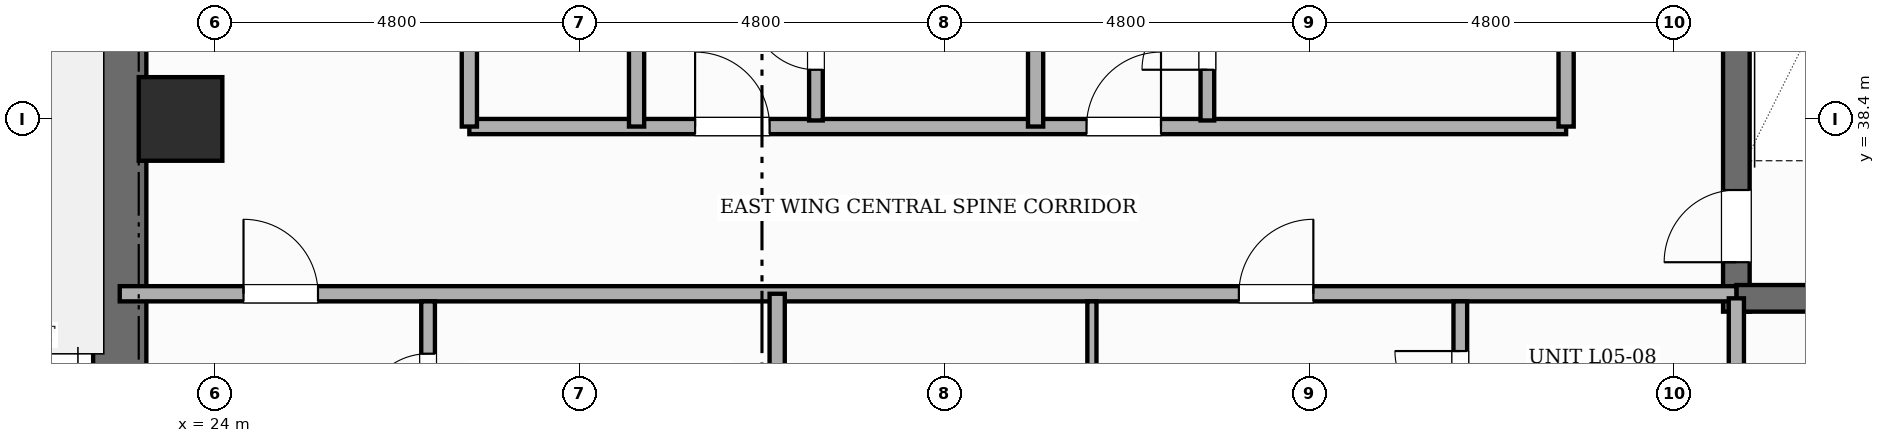
"""IFC4 building model, lengths in metres.
Left out: names, types, materials, properties, quantities, classifications, styles, units other than length and angle.
Written with IfcOpenShell. Run it as: python <this file> out.ifc"""

import sys

from ifc_helpers import new_model, si_unit, direction, frame, frame_2d, origin, origin_2d, place, context, subcontext, project, spatial, rectangle, extrude, element, fill, save


model = new_model("IFC4")
c1 = context("Model", 3, precision=1e-05, world=origin(), true_north=direction((0.0, 1.0)))
c2 = subcontext(c1, "Body", "Model", "MODEL_VIEW")
j1 = project(units=[si_unit("LENGTHUNIT", "METRE"), si_unit("PLANEANGLEUNIT", "RADIAN")], contexts=[c1])
p1 = place(None, origin())
s1 = spatial("IfcSite", under=j1, at=p1, CompositionType="ELEMENT")
p2 = place(p1, origin())
s2 = spatial("IfcBuilding", under=s1, at=p2, CompositionType="ELEMENT")
p3 = place(p2, frame((0.0, 0.0, 25.0)))
s3 = spatial("IfcBuildingStorey", under=s2, at=p3, CompositionType="ELEMENT", Elevation=25.0)
p4 = place(p3, frame((22.75, 30.55, 0.0), z_axis=(0.0, 0.0, 1.0), x_axis=(0.0, 1.0, 0.0)))
e1 = element("IfcWall", 1, at=p4, inside=s3, PredefinedType="SHEAR", context=c2, shape_type="SweptSolid", body=[
    extrude(rectangle(XDim=15.6, YDim=0.7, at=frame_2d((7.8, 0.0))), origin(), (0.0, 0.0, 1.0), 3.6),
])
p5 = place(p4, frame((10.8, 0.0, 0.0)))
e2 = element("IfcOpeningElement", 2, at=p5, cuts=e1, PredefinedType="OPENING", context=c2, shape_type="SweptSolid", body=[
    extrude(rectangle(XDim=1.0, YDim=2.15, at=frame_2d((0.5, 1.075))), frame((0.0, 0.36, 0.0), z_axis=(0.0, -1.0, 0.0), x_axis=(1.0, 0.0, 0.0)), (0.0, 0.0, 1.0), 0.72),
])
p6 = place(p3, frame((44.02, 35.865, 0.0), z_axis=(0.0, 0.0, 1.0), x_axis=(0.0, 1.0, 0.0)))
e3 = element("IfcWall", 3, at=p6, inside=s3, PredefinedType="SHEAR", context=c2, shape_type="SweptSolid", body=[
    extrude(rectangle(XDim=8.97, YDim=0.35, at=frame_2d((4.485, 0.0))), origin(), (0.0, 0.0, 1.0), 3.6),
])
p7 = place(p6, frame((0.65, 0.0, 0.0)))
e4 = element("IfcOpeningElement", 4, at=p7, cuts=e3, PredefinedType="OPENING", context=c2, shape_type="SweptSolid", body=[
    extrude(rectangle(XDim=0.95, YDim=2.1, at=frame_2d((0.475, 1.05))), frame((0.0, 0.185, 0.0), z_axis=(0.0, -1.0, 0.0), x_axis=(1.0, 0.0, 0.0)), (0.0, 0.0, 1.0), 0.37),
])
p8 = place(p3, frame((44.02, 36.04, 0.0), z_axis=(0.0, 0.0, 1.0), x_axis=(1.0, 0.0, 0.0)))
e5 = element("IfcWall", 5, at=p8, inside=s3, PredefinedType="SHEAR", context=c2, shape_type="SweptSolid", body=[
    extrude(rectangle(XDim=3.58, YDim=0.35, at=frame_2d((1.79, 0.0))), origin(), (0.0, 0.0, 1.0), 3.6),
])
p9 = place(p3, frame((23.55, 38.4, 0.0), z_axis=(0.0, 0.0, 1.0), x_axis=(1.0, 0.0, 0.0)))
e6 = element("IfcColumn", 6, at=p9, inside=s3, PredefinedType="COLUMN", context=c2, shape_type="SweptSolid", body=[
    extrude(rectangle(XDim=1.1, YDim=1.1, at=origin_2d()), origin(), (0.0, 0.0, 1.0), 3.6),
])
p10 = place(p3, frame((22.75, 36.1, 0.0), z_axis=(0.0, 0.0, 1.0), x_axis=(1.0, 0.0, 0.0)))
e7 = element("IfcWall", 7, at=p10, inside=s3, PredefinedType="PARTITIONING", context=c2, shape_type="SweptSolid", body=[
    extrude(rectangle(XDim=21.27, YDim=0.2, at=frame_2d((10.635, 0.0))), origin(), (0.0, 0.0, 1.0), 3.35),
])
p11 = place(p10, frame((1.628, 0.0, 0.0)))
e8 = element("IfcOpeningElement", 8, at=p11, cuts=e7, PredefinedType="OPENING", context=c2, shape_type="SweptSolid", body=[
    extrude(rectangle(XDim=0.98, YDim=2.18, at=frame_2d((0.49, 1.09))), frame((0.0, 0.11, 0.0), z_axis=(0.0, -1.0, 0.0), x_axis=(1.0, 0.0, 0.0)), (0.0, 0.0, 1.0), 0.22),
])
p12 = place(p10, frame((14.725, 0.0, 0.0)))
e9 = element("IfcOpeningElement", 9, at=p12, cuts=e7, PredefinedType="OPENING", context=c2, shape_type="SweptSolid", body=[
    extrude(rectangle(XDim=0.98, YDim=2.18, at=frame_2d((0.49, 1.09))), frame((0.0, 0.11, 0.0), z_axis=(0.0, -1.0, 0.0), x_axis=(1.0, 0.0, 0.0)), (0.0, 0.0, 1.0), 0.22),
])
p13 = place(p3, frame((27.35, 38.3, 0.0), z_axis=(0.0, 0.0, 1.0), x_axis=(1.0, 0.0, 0.0)))
e10 = element("IfcWall", 10, at=p13, inside=s3, PredefinedType="PARTITIONING", context=c2, shape_type="SweptSolid", body=[
    extrude(rectangle(XDim=14.43, YDim=0.2, at=frame_2d((7.215, 0.0))), origin(), (0.0, 0.0, 1.0), 3.35),
])
p14 = place(p13, frame((2.97, 0.0, 0.0)))
e11 = element("IfcOpeningElement", 11, at=p14, cuts=e10, PredefinedType="OPENING", context=c2, shape_type="SweptSolid", body=[
    extrude(rectangle(XDim=0.98, YDim=2.18, at=frame_2d((0.49, 1.09))), frame((0.0, 0.11, 0.0), z_axis=(0.0, -1.0, 0.0), x_axis=(1.0, 0.0, 0.0)), (0.0, 0.0, 1.0), 0.22),
])
p15 = place(p13, frame((8.12, 0.0, 0.0)))
e12 = element("IfcOpeningElement", 12, at=p15, cuts=e10, PredefinedType="OPENING", context=c2, shape_type="SweptSolid", body=[
    extrude(rectangle(XDim=0.98, YDim=2.18, at=frame_2d((0.49, 1.09))), frame((0.0, 0.11, 0.0), z_axis=(0.0, -1.0, 0.0), x_axis=(1.0, 0.0, 0.0)), (0.0, 0.0, 1.0), 0.22),
])
p16 = place(p3, frame((27.35, 38.3, 0.0), z_axis=(0.0, 0.0, 1.0), x_axis=(0.0, 1.0, 0.0)))
e13 = element("IfcWall", 13, at=p16, inside=s3, PredefinedType="PARTITIONING", context=c2, shape_type="SweptSolid", body=[
    extrude(rectangle(XDim=9.38, YDim=0.2, at=frame_2d((4.69, 0.0))), origin(), (0.0, 0.0, 1.0), 3.35),
])
p17 = place(p16, frame((1.2, 0.0, 0.0)))
e14 = element("IfcOpeningElement", 14, at=p17, cuts=e13, PredefinedType="OPENING", context=c2, shape_type="SweptSolid", body=[
    extrude(rectangle(XDim=0.95, YDim=2.15, at=frame_2d((0.475, 1.075))), frame((0.0, 0.11, 0.0), z_axis=(0.0, -1.0, 0.0), x_axis=(1.0, 0.0, 0.0)), (0.0, 0.0, 1.0), 0.22),
])
p18 = place(p3, frame((29.55, 38.3, 0.0), z_axis=(0.0, 0.0, 1.0), x_axis=(0.0, 1.0, 0.0)))
e15 = element("IfcWall", 15, at=p18, inside=s3, PredefinedType="SOLIDWALL", context=c2, shape_type="SweptSolid", body=[
    extrude(rectangle(XDim=9.38, YDim=0.2, at=frame_2d((4.69, 0.0))), origin(), (0.0, 0.0, 1.0), 3.35),
])
p19 = place(p3, frame((26.807, 29.12, 0.0), z_axis=(0.0, 0.0, 1.0), x_axis=(0.0, 1.0, 0.0)))
e16 = element("IfcWall", 16, at=p19, inside=s3, PredefinedType="PLUMBINGWALL", context=c2, shape_type="SweptSolid", body=[
    extrude(rectangle(XDim=6.88, YDim=0.18, at=frame_2d((3.44, 0.0))), origin(), (0.0, 0.0, 1.0), 3.35),
])
p20 = place(p19, frame((0.617, 0.0, 0.0)))
e17 = element("IfcOpeningElement", 17, at=p20, cuts=e16, PredefinedType="OPENING", context=c2, shape_type="SweptSolid", body=[
    extrude(rectangle(XDim=0.9, YDim=2.15, at=frame_2d((0.45, 1.075))), frame((0.0, 0.1, 0.0), z_axis=(0.0, -1.0, 0.0), x_axis=(1.0, 0.0, 0.0)), (0.0, 0.0, 1.0), 0.2),
])
p21 = place(p19, frame((3.21, 0.0, 0.0)))
e18 = element("IfcOpeningElement", 18, at=p21, cuts=e16, PredefinedType="OPENING", context=c2, shape_type="SweptSolid", body=[
    extrude(rectangle(XDim=0.9, YDim=2.15, at=frame_2d((0.45, 1.075))), frame((0.0, 0.1, 0.0), z_axis=(0.0, -1.0, 0.0), x_axis=(1.0, 0.0, 0.0)), (0.0, 0.0, 1.0), 0.2),
])
p22 = place(p19, frame((5.332, 0.0, 0.0)))
e19 = element("IfcOpeningElement", 19, at=p22, cuts=e16, PredefinedType="OPENING", context=c2, shape_type="SweptSolid", body=[
    extrude(rectangle(XDim=0.86, YDim=2.1, at=frame_2d((0.43, 1.05))), frame((0.0, 0.1, 0.0), z_axis=(0.0, -1.0, 0.0), x_axis=(1.0, 0.0, 0.0)), (0.0, 0.0, 1.0), 0.2),
])
p23 = place(p3, frame((31.4, 29.12, 0.0), z_axis=(0.0, 0.0, 1.0), x_axis=(0.0, 1.0, 0.0)))
e20 = element("IfcWall", 20, at=p23, inside=s3, PredefinedType="SOLIDWALL", context=c2, shape_type="SweptSolid", body=[
    extrude(rectangle(XDim=6.98, YDim=0.2, at=frame_2d((3.49, 0.0))), origin(), (0.0, 0.0, 1.0), 3.35),
])
p24 = place(p3, frame((40.388, 29.12, 0.0), z_axis=(0.0, 0.0, 1.0), x_axis=(0.0, 1.0, 0.0)))
e21 = element("IfcWall", 21, at=p24, inside=s3, PredefinedType="PLUMBINGWALL", context=c2, shape_type="SweptSolid", body=[
    extrude(rectangle(XDim=6.88, YDim=0.18, at=frame_2d((3.44, 0.0))), origin(), (0.0, 0.0, 1.0), 3.35),
])
p25 = place(p24, frame((0.679, 0.0, 0.0)))
e22 = element("IfcOpeningElement", 22, at=p25, cuts=e21, PredefinedType="OPENING", context=c2, shape_type="SweptSolid", body=[
    extrude(rectangle(XDim=0.9, YDim=2.15, at=frame_2d((0.45, 1.075))), frame((0.0, 0.1, 0.0), z_axis=(0.0, -1.0, 0.0), x_axis=(1.0, 0.0, 0.0)), (0.0, 0.0, 1.0), 0.2),
])
p26 = place(p24, frame((3.315, 0.0, 0.0)))
e23 = element("IfcOpeningElement", 23, at=p26, cuts=e21, PredefinedType="OPENING", context=c2, shape_type="SweptSolid", body=[
    extrude(rectangle(XDim=0.9, YDim=2.15, at=frame_2d((0.45, 1.075))), frame((0.0, 0.1, 0.0), z_axis=(0.0, -1.0, 0.0), x_axis=(1.0, 0.0, 0.0)), (0.0, 0.0, 1.0), 0.2),
])
p27 = place(p24, frame((5.366, 0.0, 0.0)))
e24 = element("IfcOpeningElement", 24, at=p27, cuts=e21, PredefinedType="OPENING", context=c2, shape_type="SweptSolid", body=[
    extrude(rectangle(XDim=0.86, YDim=2.1, at=frame_2d((0.43, 1.05))), frame((0.0, 0.1, 0.0), z_axis=(0.0, -1.0, 0.0), x_axis=(1.0, 0.0, 0.0)), (0.0, 0.0, 1.0), 0.2),
])
p28 = place(p3, frame((35.541, 29.12, 0.0), z_axis=(0.0, 0.0, 1.0), x_axis=(0.0, 1.0, 0.0)))
e25 = element("IfcWall", 25, at=p28, inside=s3, PredefinedType="PARTITIONING", context=c2, shape_type="SweptSolid", body=[
    extrude(rectangle(XDim=6.88, YDim=0.12, at=frame_2d((3.44, 0.0))), origin(), (0.0, 0.0, 1.0), 3.35),
])
p29 = place(p28, frame((0.679, 0.0, 0.0)))
e26 = element("IfcOpeningElement", 26, at=p29, cuts=e25, PredefinedType="OPENING", context=c2, shape_type="SweptSolid", body=[
    extrude(rectangle(XDim=0.9, YDim=2.15, at=frame_2d((0.45, 1.075))), frame((0.0, 0.07, 0.0), z_axis=(0.0, -1.0, 0.0), x_axis=(1.0, 0.0, 0.0)), (0.0, 0.0, 1.0), 0.14),
])
p30 = place(p28, frame((4.149, 0.0, 0.0)))
e27 = element("IfcOpeningElement", 27, at=p30, cuts=e25, PredefinedType="OPENING", context=c2, shape_type="SweptSolid", body=[
    extrude(rectangle(XDim=0.9, YDim=2.15, at=frame_2d((0.45, 1.075))), frame((0.0, 0.07, 0.0), z_axis=(0.0, -1.0, 0.0), x_axis=(1.0, 0.0, 0.0)), (0.0, 0.0, 1.0), 0.14),
])
p31 = place(p3, frame((31.91, 38.38, 0.0), z_axis=(0.0, 0.0, 1.0), x_axis=(0.0, 1.0, 0.0)))
e28 = element("IfcWall", 28, at=p31, inside=s3, PredefinedType="PLUMBINGWALL", context=c2, shape_type="SweptSolid", body=[
    extrude(rectangle(XDim=9.3, YDim=0.18, at=frame_2d((4.65, 0.0))), origin(), (0.0, 0.0, 1.0), 3.35),
])
p32 = place(p31, frame((0.667, 0.0, 0.0)))
e29 = element("IfcOpeningElement", 29, at=p32, cuts=e28, PredefinedType="OPENING", context=c2, shape_type="SweptSolid", body=[
    extrude(rectangle(XDim=0.86, YDim=2.1, at=frame_2d((0.43, 1.05))), frame((0.0, 0.1, 0.0), z_axis=(0.0, -1.0, 0.0), x_axis=(1.0, 0.0, 0.0)), (0.0, 0.0, 1.0), 0.2),
])
p33 = place(p31, frame((3.43, 0.0, 0.0)))
e30 = element("IfcOpeningElement", 30, at=p33, cuts=e28, PredefinedType="OPENING", context=c2, shape_type="SweptSolid", body=[
    extrude(rectangle(XDim=0.9, YDim=2.15, at=frame_2d((0.45, 1.075))), frame((0.0, 0.1, 0.0), z_axis=(0.0, -1.0, 0.0), x_axis=(1.0, 0.0, 0.0)), (0.0, 0.0, 1.0), 0.2),
])
p34 = place(p31, frame((6.828, 0.0, 0.0)))
e31 = element("IfcOpeningElement", 31, at=p34, cuts=e28, PredefinedType="OPENING", context=c2, shape_type="SweptSolid", body=[
    extrude(rectangle(XDim=0.9, YDim=2.15, at=frame_2d((0.45, 1.075))), frame((0.0, 0.1, 0.0), z_axis=(0.0, -1.0, 0.0), x_axis=(1.0, 0.0, 0.0)), (0.0, 0.0, 1.0), 0.2),
])
p35 = place(p3, frame((34.8, 38.3, 0.0), z_axis=(0.0, 0.0, 1.0), x_axis=(0.0, 1.0, 0.0)))
e32 = element("IfcWall", 32, at=p35, inside=s3, PredefinedType="SOLIDWALL", context=c2, shape_type="SweptSolid", body=[
    extrude(rectangle(XDim=9.38, YDim=0.2, at=frame_2d((4.69, 0.0))), origin(), (0.0, 0.0, 1.0), 3.35),
])
p36 = place(p3, frame((37.06, 38.38, 0.0), z_axis=(0.0, 0.0, 1.0), x_axis=(0.0, 1.0, 0.0)))
e33 = element("IfcWall", 33, at=p36, inside=s3, PredefinedType="PLUMBINGWALL", context=c2, shape_type="SweptSolid", body=[
    extrude(rectangle(XDim=9.3, YDim=0.18, at=frame_2d((4.65, 0.0))), origin(), (0.0, 0.0, 1.0), 3.35),
])
p37 = place(p36, frame((0.667, 0.0, 0.0)))
e34 = element("IfcOpeningElement", 34, at=p37, cuts=e33, PredefinedType="OPENING", context=c2, shape_type="SweptSolid", body=[
    extrude(rectangle(XDim=0.86, YDim=2.1, at=frame_2d((0.43, 1.05))), frame((0.0, 0.1, 0.0), z_axis=(0.0, -1.0, 0.0), x_axis=(1.0, 0.0, 0.0)), (0.0, 0.0, 1.0), 0.2),
])
p38 = place(p36, frame((3.43, 0.0, 0.0)))
e35 = element("IfcOpeningElement", 35, at=p38, cuts=e33, PredefinedType="OPENING", context=c2, shape_type="SweptSolid", body=[
    extrude(rectangle(XDim=0.9, YDim=2.15, at=frame_2d((0.45, 1.075))), frame((0.0, 0.1, 0.0), z_axis=(0.0, -1.0, 0.0), x_axis=(1.0, 0.0, 0.0)), (0.0, 0.0, 1.0), 0.2),
])
p39 = place(p36, frame((6.828, 0.0, 0.0)))
e36 = element("IfcOpeningElement", 36, at=p39, cuts=e33, PredefinedType="OPENING", context=c2, shape_type="SweptSolid", body=[
    extrude(rectangle(XDim=0.9, YDim=2.15, at=frame_2d((0.45, 1.075))), frame((0.0, 0.1, 0.0), z_axis=(0.0, -1.0, 0.0), x_axis=(1.0, 0.0, 0.0)), (0.0, 0.0, 1.0), 0.2),
])
p40 = place(p3, frame((41.78, 38.3, 0.0), z_axis=(0.0, 0.0, 1.0), x_axis=(0.0, 1.0, 0.0)))
e37 = element("IfcWall", 37, at=p40, inside=s3, PredefinedType="PARTITIONING", context=c2, shape_type="SweptSolid", body=[
    extrude(rectangle(XDim=9.38, YDim=0.2, at=frame_2d((4.69, 0.0))), origin(), (0.0, 0.0, 1.0), 3.35),
])
p41 = place(p3, frame((44.02, 29.12, 0.0), z_axis=(0.0, 0.0, 1.0), x_axis=(0.0, 1.0, 0.0)))
e38 = element("IfcWall", 38, at=p41, inside=s3, PredefinedType="SOLIDWALL", context=c2, shape_type="SweptSolid", body=[
    extrude(rectangle(XDim=6.92, YDim=0.2, at=frame_2d((3.46, 0.0))), origin(), (0.0, 0.0, 1.0), 3.35),
])
p42 = place(p7, origin())
e39 = element("IfcDoor", 39, at=p42, inside=s3, OperationType="SINGLE_SWING_LEFT", PredefinedType="DOOR", context=c2, shape_type="SweptSolid", body=[
    extrude(rectangle(XDim=0.95, YDim=2.1, at=frame_2d((0.475, 1.05))), frame((0.0, 0.025, 0.0), z_axis=(0.0, -1.0, 0.0), x_axis=(1.0, 0.0, 0.0)), (0.0, 0.0, 1.0), 0.05),
])
fill(e4, e39)
p43 = place(p11, origin())
e40 = element("IfcDoor", 40, at=p43, inside=s3, OperationType="SINGLE_SWING_LEFT", PredefinedType="DOOR", context=c2, shape_type="SweptSolid", body=[
    extrude(rectangle(XDim=0.98, YDim=2.18, at=frame_2d((0.49, 1.09))), frame((0.0, 0.025, 0.0), z_axis=(0.0, -1.0, 0.0), x_axis=(1.0, 0.0, 0.0)), (0.0, 0.0, 1.0), 0.05),
])
fill(e8, e40)
p44 = place(p22, origin())
e41 = element("IfcDoor", 41, at=p44, inside=s3, OperationType="SINGLE_SWING_LEFT", PredefinedType="DOOR", context=c2, shape_type="SweptSolid", body=[
    extrude(rectangle(XDim=0.86, YDim=2.1, at=frame_2d((0.43, 1.05))), frame((0.0, 0.025, 0.0), z_axis=(0.0, -1.0, 0.0), x_axis=(1.0, 0.0, 0.0)), (0.0, 0.0, 1.0), 0.05),
])
fill(e19, e41)
p45 = place(p12, origin())
e42 = element("IfcDoor", 42, at=p45, inside=s3, OperationType="SINGLE_SWING_RIGHT", PredefinedType="DOOR", context=c2, shape_type="SweptSolid", body=[
    extrude(rectangle(XDim=0.98, YDim=2.18, at=frame_2d((0.49, 1.09))), frame((0.0, 0.025, 0.0), z_axis=(0.0, -1.0, 0.0), x_axis=(1.0, 0.0, 0.0)), (0.0, 0.0, 1.0), 0.05),
])
fill(e9, e42)
p46 = place(p27, origin())
e43 = element("IfcDoor", 43, at=p46, inside=s3, OperationType="SINGLE_SWING_RIGHT", PredefinedType="DOOR", context=c2, shape_type="SweptSolid", body=[
    extrude(rectangle(XDim=0.86, YDim=2.1, at=frame_2d((0.43, 1.05))), frame((0.0, 0.025, 0.0), z_axis=(0.0, -1.0, 0.0), x_axis=(1.0, 0.0, 0.0)), (0.0, 0.0, 1.0), 0.05),
])
fill(e24, e43)
p47 = place(p14, origin())
e44 = element("IfcDoor", 44, at=p47, inside=s3, OperationType="SINGLE_SWING_LEFT", PredefinedType="DOOR", context=c2, shape_type="SweptSolid", body=[
    extrude(rectangle(XDim=0.98, YDim=2.18, at=frame_2d((0.49, 1.09))), frame((0.0, 0.025, 0.0), z_axis=(0.0, -1.0, 0.0), x_axis=(1.0, 0.0, 0.0)), (0.0, 0.0, 1.0), 0.05),
])
fill(e11, e44)
p48 = place(p32, origin())
e45 = element("IfcDoor", 45, at=p48, inside=s3, OperationType="SINGLE_SWING_RIGHT", PredefinedType="DOOR", context=c2, shape_type="SweptSolid", body=[
    extrude(rectangle(XDim=0.86, YDim=2.1, at=frame_2d((0.43, 1.05))), frame((0.0, 0.025, 0.0), z_axis=(0.0, -1.0, 0.0), x_axis=(1.0, 0.0, 0.0)), (0.0, 0.0, 1.0), 0.05),
])
fill(e29, e45)
p49 = place(p15, origin())
e46 = element("IfcDoor", 46, at=p49, inside=s3, OperationType="SINGLE_SWING_RIGHT", PredefinedType="DOOR", context=c2, shape_type="SweptSolid", body=[
    extrude(rectangle(XDim=0.98, YDim=2.18, at=frame_2d((0.49, 1.09))), frame((0.0, 0.025, 0.0), z_axis=(0.0, -1.0, 0.0), x_axis=(1.0, 0.0, 0.0)), (0.0, 0.0, 1.0), 0.05),
])
fill(e12, e46)
p50 = place(p37, origin())
e47 = element("IfcDoor", 47, at=p50, inside=s3, OperationType="SINGLE_SWING_LEFT", PredefinedType="DOOR", context=c2, shape_type="SweptSolid", body=[
    extrude(rectangle(XDim=0.86, YDim=2.1, at=frame_2d((0.43, 1.05))), frame((0.0, 0.025, 0.0), z_axis=(0.0, -1.0, 0.0), x_axis=(1.0, 0.0, 0.0)), (0.0, 0.0, 1.0), 0.05),
])
fill(e34, e47)
save(model, sys.argv[1])
